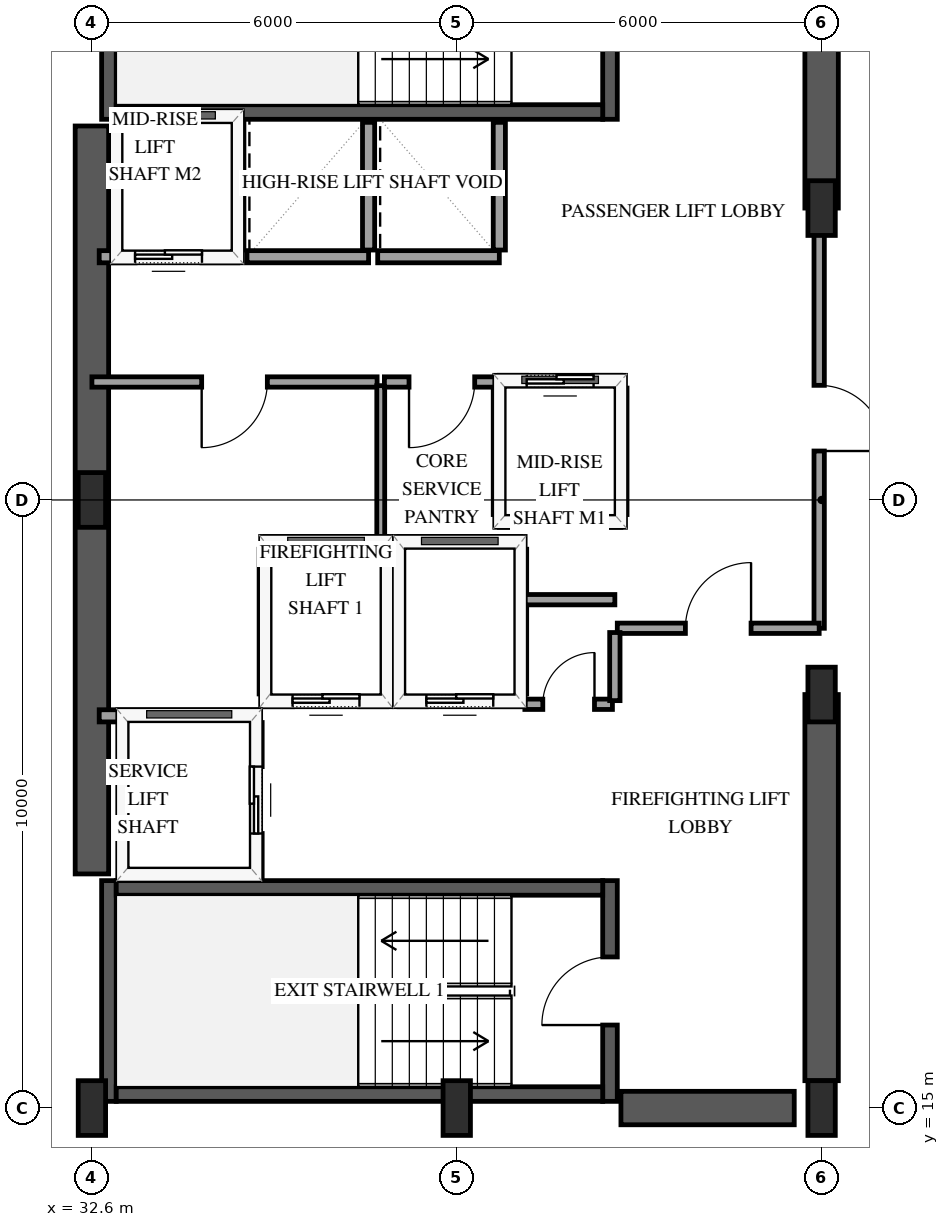
"""IFC4 building model, lengths in metres.
Left out: names, types, materials, properties, quantities, classifications, styles, units other than length and angle.
Written with IfcOpenShell. Run it as: python <this file> out.ifc"""

import sys

from ifc_helpers import new_model, si_unit, direction, frame, frame_2d, origin, origin_2d, place, context, subcontext, project, spatial, rectangle, extrude, element, fill, save


model = new_model("IFC4")
c1 = context("Model", 3, precision=1e-05, world=origin(), true_north=direction((0.0, 1.0)))
c2 = subcontext(c1, "Body", "Model", "MODEL_VIEW")
j1 = project(units=[si_unit("LENGTHUNIT", "METRE"), si_unit("PLANEANGLEUNIT", "RADIAN")], contexts=[c1])
p1 = place(None, origin())
s1 = spatial("IfcSite", under=j1, at=p1, CompositionType="ELEMENT")
p2 = place(p1, origin())
s2 = spatial("IfcBuilding", under=s1, at=p2, CompositionType="ELEMENT")
p3 = place(p2, frame((0.0, 0.0, 167.8)))
s3 = spatial("IfcBuildingStorey", under=s2, at=p3, CompositionType="ELEMENT", Elevation=167.8)
p4 = place(p3, frame((32.88, 15.11, 0.0), z_axis=(0.0, 0.0, 1.0), x_axis=(0.0, 1.0, 0.0)))
e1 = element("IfcWall", 1, at=p4, inside=s3, PredefinedType="SHEAR", context=c2, shape_type="SweptSolid", body=[
    extrude(rectangle(XDim=3.63, YDim=0.24, at=frame_2d((1.815, 0.0))), origin(), (0.0, 0.0, 1.0), 3.6),
])
p5 = place(p3, frame((41.12, 15.11, 0.0), z_axis=(0.0, 0.0, 1.0), x_axis=(0.0, 1.0, 0.0)))
e2 = element("IfcWall", 2, at=p5, inside=s3, PredefinedType="SHEAR", context=c2, shape_type="SweptSolid", body=[
    extrude(rectangle(XDim=3.63, YDim=0.24, at=frame_2d((1.815, 0.0))), origin(), (0.0, 0.0, 1.0), 3.6),
])
p6 = place(p5, frame((1.255, 0.0, 0.0)))
e3 = element("IfcOpeningElement", 3, at=p6, cuts=e2, PredefinedType="OPENING", context=c2, shape_type="SweptSolid", body=[
    extrude(rectangle(XDim=1.12, YDim=2.15, at=frame_2d((0.56, 1.075))), frame((0.0, 0.13, 0.0), z_axis=(0.0, -1.0, 0.0), x_axis=(1.0, 0.0, 0.0)), (0.0, 0.0, 1.0), 0.26),
])
for number, where, z_axis, x_axis in (
    (4, (33.0, 15.23, 0.0), (0.0, 0.0, 1.0), (1.0, 0.0, 0.0)),
    (5, (33.0, 18.62, 0.0), (0.0, 0.0, 1.0), (1.0, 0.0, 0.0)),
):
    element("IfcWall", number, at=place(p3, frame(where, z_axis=z_axis, x_axis=x_axis)), inside=s3, PredefinedType="SHEAR", context=c2, shape_type="SweptSolid", body=[
        extrude(rectangle(XDim=8.0, YDim=0.24, at=frame_2d((4.0, 0.0))), origin(), (0.0, 0.0, 1.0), 3.6),
    ])
p7 = place(p3, frame((32.88, 31.26, 0.0), z_axis=(0.0, 0.0, 1.0), x_axis=(0.0, 1.0, 0.0)))
e6 = element("IfcWall", 6, at=p7, inside=s3, PredefinedType="SHEAR", context=c2, shape_type="SweptSolid", body=[
    extrude(rectangle(XDim=3.63, YDim=0.24, at=frame_2d((1.815, 0.0))), origin(), (0.0, 0.0, 1.0), 3.6),
])
p8 = place(p3, frame((41.12, 31.26, 0.0), z_axis=(0.0, 0.0, 1.0), x_axis=(0.0, 1.0, 0.0)))
e7 = element("IfcWall", 7, at=p8, inside=s3, PredefinedType="SHEAR", context=c2, shape_type="SweptSolid", body=[
    extrude(rectangle(XDim=3.63, YDim=0.24, at=frame_2d((1.815, 0.0))), origin(), (0.0, 0.0, 1.0), 3.6),
])
p9 = place(p8, frame((1.255, 0.0, 0.0)))
e8 = element("IfcOpeningElement", 8, at=p9, cuts=e7, PredefinedType="OPENING", context=c2, shape_type="SweptSolid", body=[
    extrude(rectangle(XDim=1.12, YDim=2.15, at=frame_2d((0.56, 1.075))), frame((0.0, 0.13, 0.0), z_axis=(0.0, -1.0, 0.0), x_axis=(1.0, 0.0, 0.0)), (0.0, 0.0, 1.0), 0.26),
])
p10 = place(p3, frame((33.0, 31.38, 0.0), z_axis=(0.0, 0.0, 1.0), x_axis=(1.0, 0.0, 0.0)))
e9 = element("IfcWall", 9, at=p10, inside=s3, PredefinedType="SHEAR", context=c2, shape_type="SweptSolid", body=[
    extrude(rectangle(XDim=8.0, YDim=0.24, at=frame_2d((4.0, 0.0))), origin(), (0.0, 0.0, 1.0), 3.6),
])
p11 = place(p3, frame((32.6, 18.85, 0.0), z_axis=(0.0, 0.0, 1.0), x_axis=(0.0, 1.0, 0.0)))
e10 = element("IfcWall", 10, at=p11, inside=s3, PredefinedType="SHEAR", context=c2, shape_type="SweptSolid", body=[
    extrude(rectangle(XDim=12.3, YDim=0.55, at=frame_2d((6.15, 0.0))), origin(), (0.0, 0.0, 1.0), 3.6),
])
p12 = place(p3, frame((41.3, 15.0, 0.0), z_axis=(0.0, 0.0, 1.0), x_axis=(1.0, 0.0, 0.0)))
e11 = element("IfcWall", 11, at=p12, inside=s3, PredefinedType="SHEAR", context=c2, shape_type="SweptSolid", body=[
    extrude(rectangle(XDim=2.85, YDim=0.55, at=frame_2d((1.425, 0.0))), origin(), (0.0, 0.0, 1.0), 3.6),
])
p13 = place(p3, frame((44.6, 15.45, 0.0), z_axis=(0.0, 0.0, 1.0), x_axis=(0.0, 1.0, 0.0)))
e12 = element("IfcWall", 12, at=p13, inside=s3, PredefinedType="SHEAR", context=c2, shape_type="SweptSolid", body=[
    extrude(rectangle(XDim=6.35, YDim=0.55, at=frame_2d((3.175, 0.0))), origin(), (0.0, 0.0, 1.0), 3.6),
])
p14 = place(p3, frame((44.6, 29.8, 0.0), z_axis=(0.0, 0.0, 1.0), x_axis=(0.0, 1.0, 0.0)))
e13 = element("IfcWall", 13, at=p14, inside=s3, PredefinedType="SHEAR", context=c2, shape_type="SweptSolid", body=[
    extrude(rectangle(XDim=4.75, YDim=0.55, at=frame_2d((2.375, 0.0))), origin(), (0.0, 0.0, 1.0), 3.6),
])
for number, where, z_axis, x_axis in (
    (14, (32.6, 15.0, 0.0), (0.0, 0.0, 1.0), (1.0, 0.0, 0.0)),
    (15, (32.6, 25.0, 0.0), (0.0, 0.0, 1.0), (1.0, 0.0, 0.0)),
    (16, (38.6, 15.0, 0.0), (0.0, 0.0, 1.0), (1.0, 0.0, 0.0)),
    (17, (44.6, 15.0, 0.0), (0.0, 0.0, 1.0), (1.0, 0.0, 0.0)),
    (18, (44.6, 21.8, 0.0), (0.0, 0.0, 1.0), (1.0, 0.0, 0.0)),
    (19, (44.6, 29.8, 0.0), (0.0, 0.0, 1.0), (1.0, 0.0, 0.0)),
):
    element("IfcColumn", number, at=place(p3, frame(where, z_axis=z_axis, x_axis=x_axis)), inside=s3, PredefinedType="PILASTER", context=c2, shape_type="SweptSolid", body=[
        extrude(rectangle(XDim=0.45, YDim=0.9, at=origin_2d()), origin(), (0.0, 0.0, 1.0), 3.6),
    ])
p15 = place(p3, frame((35.45, 21.7, 0.0), z_axis=(0.0, 0.0, 1.0), x_axis=(1.0, 0.0, 0.0)))
e20 = element("IfcWall", 20, at=p15, inside=s3, PredefinedType="SOLIDWALL", context=c2, shape_type="SweptSolid", body=[
    extrude(rectangle(XDim=2.0, YDim=0.2, at=frame_2d((1.0, 0.0))), origin(), (0.0, 0.0, 1.0), 3.3),
])
p16 = place(p15, frame((0.45, 0.0, 0.0)))
e21 = element("IfcOpeningElement", 21, at=p16, cuts=e20, PredefinedType="OPENING", context=c2, shape_type="SweptSolid", body=[
    extrude(rectangle(XDim=1.1, YDim=2.15, at=frame_2d((0.55, 1.075))), frame((0.0, 0.11, 0.0), z_axis=(0.0, -1.0, 0.0), x_axis=(1.0, 0.0, 0.0)), (0.0, 0.0, 1.0), 0.22),
])
p17 = place(p3, frame((35.45, 24.3, 0.0), z_axis=(0.0, 0.0, 1.0), x_axis=(1.0, 0.0, 0.0)))
e22 = element("IfcWall", 22, at=p17, inside=s3, PredefinedType="SOLIDWALL", context=c2, shape_type="SweptSolid", body=[
    extrude(rectangle(XDim=2.0, YDim=0.2, at=frame_2d((1.0, 0.0))), origin(), (0.0, 0.0, 1.0), 3.3),
])
for number, where, z_axis, x_axis in (
    (23, (35.45, 21.81, 0.0), (0.0, 0.0, 1.0), (0.0, 1.0, 0.0)),
    (24, (37.45, 21.81, 0.0), (0.0, 0.0, 1.0), (0.0, 1.0, 0.0)),
):
    element("IfcWall", number, at=place(p3, frame(where, z_axis=z_axis, x_axis=x_axis)), inside=s3, PredefinedType="SOLIDWALL", context=c2, shape_type="SweptSolid", body=[
        extrude(rectangle(XDim=2.38, YDim=0.2, at=frame_2d((1.19, 0.0))), origin(), (0.0, 0.0, 1.0), 3.3),
    ])
p18 = place(p3, frame((37.65, 21.7, 0.0), z_axis=(0.0, 0.0, 1.0), x_axis=(1.0, 0.0, 0.0)))
e25 = element("IfcWall", 25, at=p18, inside=s3, PredefinedType="SOLIDWALL", context=c2, shape_type="SweptSolid", body=[
    extrude(rectangle(XDim=2.0, YDim=0.2, at=frame_2d((1.0, 0.0))), origin(), (0.0, 0.0, 1.0), 3.3),
])
p19 = place(p18, frame((0.45, 0.0, 0.0)))
e26 = element("IfcOpeningElement", 26, at=p19, cuts=e25, PredefinedType="OPENING", context=c2, shape_type="SweptSolid", body=[
    extrude(rectangle(XDim=1.1, YDim=2.15, at=frame_2d((0.55, 1.075))), frame((0.0, 0.11, 0.0), z_axis=(0.0, -1.0, 0.0), x_axis=(1.0, 0.0, 0.0)), (0.0, 0.0, 1.0), 0.22),
])
p20 = place(p3, frame((37.65, 24.3, 0.0), z_axis=(0.0, 0.0, 1.0), x_axis=(1.0, 0.0, 0.0)))
e27 = element("IfcWall", 27, at=p20, inside=s3, PredefinedType="SOLIDWALL", context=c2, shape_type="SweptSolid", body=[
    extrude(rectangle(XDim=2.0, YDim=0.2, at=frame_2d((1.0, 0.0))), origin(), (0.0, 0.0, 1.0), 3.3),
])
p21 = place(p3, frame((39.65, 21.81, 0.0), z_axis=(0.0, 0.0, 1.0), x_axis=(0.0, 1.0, 0.0)))
e28 = element("IfcWall", 28, at=p21, inside=s3, PredefinedType="SOLIDWALL", context=c2, shape_type="SweptSolid", body=[
    extrude(rectangle(XDim=2.38, YDim=0.2, at=frame_2d((1.19, 0.0))), origin(), (0.0, 0.0, 1.0), 3.3),
])
p22 = place(p3, frame((32.72, 21.45, 0.0), z_axis=(0.0, 0.0, 1.0), x_axis=(1.0, 0.0, 0.0)))
e29 = element("IfcWall", 29, at=p22, inside=s3, PredefinedType="SOLIDWALL", context=c2, shape_type="SweptSolid", body=[
    extrude(rectangle(XDim=2.58, YDim=0.2, at=frame_2d((1.29, 0.0))), origin(), (0.0, 0.0, 1.0), 3.3),
])
p23 = place(p3, frame((35.3, 18.79, 0.0), z_axis=(0.0, 0.0, 1.0), x_axis=(0.0, 1.0, 0.0)))
e30 = element("IfcWall", 30, at=p23, inside=s3, PredefinedType="SOLIDWALL", context=c2, shape_type="SweptSolid", body=[
    extrude(rectangle(XDim=2.55, YDim=0.2, at=frame_2d((1.275, 0.0))), origin(), (0.0, 0.0, 1.0), 3.3),
])
p24 = place(p23, frame((0.725, 0.0, 0.0)))
e31 = element("IfcOpeningElement", 31, at=p24, cuts=e30, PredefinedType="OPENING", context=c2, shape_type="SweptSolid", body=[
    extrude(rectangle(XDim=1.1, YDim=2.15, at=frame_2d((0.55, 1.075))), frame((0.0, 0.11, 0.0), z_axis=(0.0, -1.0, 0.0), x_axis=(1.0, 0.0, 0.0)), (0.0, 0.0, 1.0), 0.22),
])
p25 = place(p3, frame((39.3, 24.65, 0.0), z_axis=(0.0, 0.0, 1.0), x_axis=(1.0, 0.0, 0.0)))
e32 = element("IfcWall", 32, at=p25, inside=s3, PredefinedType="SOLIDWALL", context=c2, shape_type="SweptSolid", body=[
    extrude(rectangle(XDim=2.0, YDim=0.2, at=frame_2d((1.0, 0.0))), origin(), (0.0, 0.0, 1.0), 3.3),
])
p26 = place(p3, frame((39.3, 26.95, 0.0), z_axis=(0.0, 0.0, 1.0), x_axis=(1.0, 0.0, 0.0)))
e33 = element("IfcWall", 33, at=p26, inside=s3, PredefinedType="SOLIDWALL", context=c2, shape_type="SweptSolid", body=[
    extrude(rectangle(XDim=2.0, YDim=0.2, at=frame_2d((1.0, 0.0))), origin(), (0.0, 0.0, 1.0), 3.3),
])
p27 = place(p26, frame((0.45, 0.0, 0.0)))
e34 = element("IfcOpeningElement", 34, at=p27, cuts=e33, PredefinedType="OPENING", context=c2, shape_type="SweptSolid", body=[
    extrude(rectangle(XDim=1.1, YDim=2.15, at=frame_2d((0.55, 1.075))), frame((0.0, 0.11, 0.0), z_axis=(0.0, -1.0, 0.0), x_axis=(1.0, 0.0, 0.0)), (0.0, 0.0, 1.0), 0.22),
])
for number, where, z_axis, x_axis in (
    (35, (39.3, 24.76, 0.0), (0.0, 0.0, 1.0), (0.0, 1.0, 0.0)),
    (36, (41.3, 24.76, 0.0), (0.0, 0.0, 1.0), (0.0, 1.0, 0.0)),
):
    element("IfcWall", number, at=place(p3, frame(where, z_axis=z_axis, x_axis=x_axis)), inside=s3, PredefinedType="SOLIDWALL", context=c2, shape_type="SweptSolid", body=[
        extrude(rectangle(XDim=2.08, YDim=0.2, at=frame_2d((1.04, 0.0))), origin(), (0.0, 0.0, 1.0), 3.3),
    ])
p28 = place(p3, frame((32.72, 29.0, 0.0), z_axis=(0.0, 0.0, 1.0), x_axis=(1.0, 0.0, 0.0)))
e37 = element("IfcWall", 37, at=p28, inside=s3, PredefinedType="SOLIDWALL", context=c2, shape_type="SweptSolid", body=[
    extrude(rectangle(XDim=2.28, YDim=0.2, at=frame_2d((1.14, 0.0))), origin(), (0.0, 0.0, 1.0), 3.3),
])
p29 = place(p28, frame((0.59, 0.0, 0.0)))
e38 = element("IfcOpeningElement", 38, at=p29, cuts=e37, PredefinedType="OPENING", context=c2, shape_type="SweptSolid", body=[
    extrude(rectangle(XDim=1.1, YDim=2.15, at=frame_2d((0.55, 1.075))), frame((0.0, 0.11, 0.0), z_axis=(0.0, -1.0, 0.0), x_axis=(1.0, 0.0, 0.0)), (0.0, 0.0, 1.0), 0.22),
])
p30 = place(p3, frame((35.0, 29.11, 0.0), z_axis=(0.0, 0.0, 1.0), x_axis=(0.0, 1.0, 0.0)))
e39 = element("IfcWall", 39, at=p30, inside=s3, PredefinedType="SOLIDWALL", context=c2, shape_type="SweptSolid", body=[
    extrude(rectangle(XDim=2.1, YDim=0.2, at=frame_2d((1.05, 0.0))), origin(), (0.0, 0.0, 1.0), 3.3),
])
p31 = place(p3, frame((35.15, 29.0, 0.0), z_axis=(0.0, 0.0, 1.0), x_axis=(1.0, 0.0, 0.0)))
e40 = element("IfcWall", 40, at=p31, inside=s3, PredefinedType="SOLIDWALL", context=c2, shape_type="SweptSolid", body=[
    extrude(rectangle(XDim=2.0, YDim=0.2, at=frame_2d((1.0, 0.0))), origin(), (0.0, 0.0, 1.0), 2.674),
])
p32 = place(p3, frame((37.15, 29.11, 0.0), z_axis=(0.0, 0.0, 1.0), x_axis=(0.0, 1.0, 0.0)))
e41 = element("IfcWall", 41, at=p32, inside=s3, PredefinedType="SOLIDWALL", context=c2, shape_type="SweptSolid", body=[
    extrude(rectangle(XDim=2.1, YDim=0.2, at=frame_2d((1.05, 0.0))), origin(), (0.0, 0.0, 1.0), 3.3),
])
p33 = place(p3, frame((37.3, 29.0, 0.0), z_axis=(0.0, 0.0, 1.0), x_axis=(1.0, 0.0, 0.0)))
e42 = element("IfcWall", 42, at=p33, inside=s3, PredefinedType="SOLIDWALL", context=c2, shape_type="SweptSolid", body=[
    extrude(rectangle(XDim=2.0, YDim=0.2, at=frame_2d((1.0, 0.0))), origin(), (0.0, 0.0, 1.0), 2.674),
])
p34 = place(p3, frame((39.3, 29.11, 0.0), z_axis=(0.0, 0.0, 1.0), x_axis=(0.0, 1.0, 0.0)))
e43 = element("IfcWall", 43, at=p34, inside=s3, PredefinedType="SOLIDWALL", context=c2, shape_type="SweptSolid", body=[
    extrude(rectangle(XDim=2.1, YDim=0.2, at=frame_2d((1.05, 0.0))), origin(), (0.0, 0.0, 1.0), 3.3),
])
p35 = place(p3, frame((44.56, 29.8, 0.0), z_axis=(0.0, 0.0, 1.0), x_axis=(0.0, -1.0, 0.0)))
e44 = element("IfcWall", 44, at=p35, inside=s3, PredefinedType="PARTITIONING", context=c2, shape_type="SweptSolid", body=[
    extrude(rectangle(XDim=6.91, YDim=0.17, at=frame_2d((3.455, 0.0))), origin(), (0.0, 0.0, 1.0), 2.34),
])
p36 = place(p35, frame((2.915, 0.0, 0.0)))
e45 = element("IfcOpeningElement", 45, at=p36, cuts=e44, PredefinedType="OPENING", context=c2, shape_type="SweptSolid", body=[
    extrude(rectangle(XDim=1.08, YDim=2.15, at=frame_2d((0.54, 1.075))), frame((0.0, 0.095, 0.0), z_axis=(0.0, -1.0, 0.0), x_axis=(1.0, 0.0, 0.0)), (0.0, 0.0, 1.0), 0.19),
])
p37 = place(p3, frame((37.29, 26.94, 0.0), z_axis=(0.0, 0.0, 1.0), x_axis=(-1.0, 0.0, 0.0)))
e46 = element("IfcWall", 46, at=p37, inside=s3, PredefinedType="PARTITIONING", context=c2, shape_type="SweptSolid", body=[
    extrude(rectangle(XDim=4.69, YDim=0.17, at=frame_2d((2.345, 0.0))), origin(), (0.0, 0.0, 1.0), 3.3),
])
p38 = place(p37, frame((1.805, 0.0, 0.0)))
e47 = element("IfcOpeningElement", 47, at=p38, cuts=e46, PredefinedType="OPENING", context=c2, shape_type="SweptSolid", body=[
    extrude(rectangle(XDim=1.08, YDim=2.15, at=frame_2d((0.54, 1.075))), frame((0.0, 0.095, 0.0), z_axis=(0.0, -1.0, 0.0), x_axis=(1.0, 0.0, 0.0)), (0.0, 0.0, 1.0), 0.19),
])
p39 = place(p3, frame((41.24, 22.89, 0.0), z_axis=(0.0, 0.0, 1.0), x_axis=(1.0, 0.0, 0.0)))
e48 = element("IfcWall", 48, at=p39, inside=s3, PredefinedType="PARTITIONING", context=c2, shape_type="SweptSolid", body=[
    extrude(rectangle(XDim=3.32, YDim=0.17, at=frame_2d((1.66, 0.0))), origin(), (0.0, 0.0, 1.0), 3.3),
])
p40 = place(p39, frame((1.12, 0.0, 0.0)))
e49 = element("IfcOpeningElement", 49, at=p40, cuts=e48, PredefinedType="OPENING", context=c2, shape_type="SweptSolid", body=[
    extrude(rectangle(XDim=1.08, YDim=2.15, at=frame_2d((0.54, 1.075))), frame((0.0, 0.095, 0.0), z_axis=(0.0, -1.0, 0.0), x_axis=(1.0, 0.0, 0.0)), (0.0, 0.0, 1.0), 0.19),
])
p41 = place(p3, frame((37.35, 26.88, 0.0), z_axis=(0.0, 0.0, 1.0), x_axis=(0.0, -1.0, 0.0)))
e50 = element("IfcWall", 50, at=p41, inside=s3, PredefinedType="PARTITIONING", context=c2, shape_type="SweptSolid", body=[
    extrude(rectangle(XDim=2.58, YDim=0.13, at=frame_2d((1.29, 0.0))), origin(), (0.0, 0.0, 1.0), 3.3),
])
p42 = place(p3, frame((39.3, 26.94, 0.0), z_axis=(0.0, 0.0, 1.0), x_axis=(-1.0, 0.0, 0.0)))
e51 = element("IfcWall", 51, at=p42, inside=s3, PredefinedType="PARTITIONING", context=c2, shape_type="SweptSolid", body=[
    extrude(rectangle(XDim=1.89, YDim=0.17, at=frame_2d((0.945, 0.0))), origin(), (0.0, 0.0, 1.0), 3.3),
])
p43 = place(p42, frame((0.405, 0.0, 0.0)))
e52 = element("IfcOpeningElement", 52, at=p43, cuts=e51, PredefinedType="OPENING", context=c2, shape_type="SweptSolid", body=[
    extrude(rectangle(XDim=1.08, YDim=2.15, at=frame_2d((0.54, 1.075))), frame((0.0, 0.095, 0.0), z_axis=(0.0, -1.0, 0.0), x_axis=(1.0, 0.0, 0.0)), (0.0, 0.0, 1.0), 0.19),
])
p44 = place(p3, frame((39.72, 21.64, 0.0), z_axis=(0.0, 0.0, 1.0), x_axis=(1.0, 0.0, 0.0)))
e53 = element("IfcWall", 53, at=p44, inside=s3, PredefinedType="PARTITIONING", context=c2, shape_type="SweptSolid", body=[
    extrude(rectangle(XDim=1.44, YDim=0.17, at=frame_2d((0.72, 0.0))), origin(), (0.0, 0.0, 1.0), 3.3),
])
p45 = place(p44, frame((0.295, 0.0, 0.0)))
e54 = element("IfcOpeningElement", 54, at=p45, cuts=e53, PredefinedType="OPENING", context=c2, shape_type="SweptSolid", body=[
    extrude(rectangle(XDim=0.85, YDim=2.1, at=frame_2d((0.425, 1.05))), frame((0.0, 0.095, 0.0), z_axis=(0.0, -1.0, 0.0), x_axis=(1.0, 0.0, 0.0)), (0.0, 0.0, 1.0), 0.19),
])
p46 = place(p3, frame((41.2, 21.7, 0.0), z_axis=(0.0, 0.0, 1.0), x_axis=(0.0, 1.0, 0.0)))
e55 = element("IfcWall", 55, at=p46, inside=s3, PredefinedType="PARTITIONING", context=c2, shape_type="SweptSolid", body=[
    extrude(rectangle(XDim=1.12, YDim=0.17, at=frame_2d((0.56, 0.0))), origin(), (0.0, 0.0, 1.0), 3.3),
])
p47 = place(p3, frame((41.2, 23.36, 0.0), z_axis=(0.0, 0.0, 1.0), x_axis=(-1.0, 0.0, 0.0)))
e56 = element("IfcWall", 56, at=p47, inside=s3, PredefinedType="PARTITIONING", context=c2, shape_type="SweptSolid", body=[
    extrude(rectangle(XDim=1.48, YDim=0.17, at=frame_2d((0.74, 0.0))), origin(), (0.0, 0.0, 1.0), 3.3),
])
p48 = place(p16, origin())
e57 = element("IfcDoor", 57, at=p48, inside=s3, OperationType="SLIDING_TO_LEFT", PredefinedType="DOOR", context=c2, shape_type="SweptSolid", body=[
    extrude(rectangle(XDim=1.1, YDim=2.15, at=frame_2d((0.55, 1.075))), frame((0.0, 0.025, 0.0), z_axis=(0.0, -1.0, 0.0), x_axis=(1.0, 0.0, 0.0)), (0.0, 0.0, 1.0), 0.05),
])
fill(e21, e57)
p49 = place(p19, origin())
e58 = element("IfcDoor", 58, at=p49, inside=s3, OperationType="SLIDING_TO_LEFT", PredefinedType="DOOR", context=c2, shape_type="SweptSolid", body=[
    extrude(rectangle(XDim=1.1, YDim=2.15, at=frame_2d((0.55, 1.075))), frame((0.0, 0.025, 0.0), z_axis=(0.0, -1.0, 0.0), x_axis=(1.0, 0.0, 0.0)), (0.0, 0.0, 1.0), 0.05),
])
fill(e26, e58)
p50 = place(p24, origin())
e59 = element("IfcDoor", 59, at=p50, inside=s3, OperationType="SLIDING_TO_LEFT", PredefinedType="DOOR", context=c2, shape_type="SweptSolid", body=[
    extrude(rectangle(XDim=1.1, YDim=2.15, at=frame_2d((0.55, 1.075))), frame((0.0, 0.025, 0.0), z_axis=(0.0, -1.0, 0.0), x_axis=(1.0, 0.0, 0.0)), (0.0, 0.0, 1.0), 0.05),
])
fill(e31, e59)
p51 = place(p27, origin())
e60 = element("IfcDoor", 60, at=p51, inside=s3, OperationType="SLIDING_TO_LEFT", PredefinedType="DOOR", context=c2, shape_type="SweptSolid", body=[
    extrude(rectangle(XDim=1.1, YDim=2.15, at=frame_2d((0.55, 1.075))), frame((0.0, 0.025, 0.0), z_axis=(0.0, -1.0, 0.0), x_axis=(1.0, 0.0, 0.0)), (0.0, 0.0, 1.0), 0.05),
])
fill(e34, e60)
p52 = place(p29, origin())
e61 = element("IfcDoor", 61, at=p52, inside=s3, OperationType="SLIDING_TO_LEFT", PredefinedType="DOOR", context=c2, shape_type="SweptSolid", body=[
    extrude(rectangle(XDim=1.1, YDim=2.15, at=frame_2d((0.55, 1.075))), frame((0.0, 0.025, 0.0), z_axis=(0.0, -1.0, 0.0), x_axis=(1.0, 0.0, 0.0)), (0.0, 0.0, 1.0), 0.05),
])
fill(e38, e61)
p53 = place(p6, origin())
e62 = element("IfcDoor", 62, at=p53, inside=s3, OperationType="SINGLE_SWING_LEFT", PredefinedType="DOOR", context=c2, shape_type="SweptSolid", body=[
    extrude(rectangle(XDim=1.12, YDim=2.15, at=frame_2d((0.56, 1.075))), frame((0.0, 0.025, 0.0), z_axis=(0.0, -1.0, 0.0), x_axis=(1.0, 0.0, 0.0)), (0.0, 0.0, 1.0), 0.05),
])
fill(e3, e62)
p54 = place(p36, origin())
e63 = element("IfcDoor", 63, at=p54, inside=s3, OperationType="SINGLE_SWING_RIGHT", PredefinedType="DOOR", context=c2, shape_type="SweptSolid", body=[
    extrude(rectangle(XDim=1.08, YDim=2.15, at=frame_2d((0.54, 1.075))), frame((0.0, 0.025, 0.0), z_axis=(0.0, -1.0, 0.0), x_axis=(1.0, 0.0, 0.0)), (0.0, 0.0, 1.0), 0.05),
])
fill(e45, e63)
p55 = place(p38, origin())
e64 = element("IfcDoor", 64, at=p55, inside=s3, OperationType="SINGLE_SWING_RIGHT", PredefinedType="DOOR", context=c2, shape_type="SweptSolid", body=[
    extrude(rectangle(XDim=1.08, YDim=2.15, at=frame_2d((0.54, 1.075))), frame((0.0, 0.025, 0.0), z_axis=(0.0, -1.0, 0.0), x_axis=(1.0, 0.0, 0.0)), (0.0, 0.0, 1.0), 0.05),
])
fill(e47, e64)
p56 = place(p40, origin())
e65 = element("IfcDoor", 65, at=p56, inside=s3, OperationType="SINGLE_SWING_RIGHT", PredefinedType="DOOR", context=c2, shape_type="SweptSolid", body=[
    extrude(rectangle(XDim=1.08, YDim=2.15, at=frame_2d((0.54, 1.075))), frame((0.0, 0.025, 0.0), z_axis=(0.0, -1.0, 0.0), x_axis=(1.0, 0.0, 0.0)), (0.0, 0.0, 1.0), 0.05),
])
fill(e49, e65)
p57 = place(p43, origin())
e66 = element("IfcDoor", 66, at=p57, inside=s3, OperationType="SINGLE_SWING_RIGHT", PredefinedType="DOOR", context=c2, shape_type="SweptSolid", body=[
    extrude(rectangle(XDim=1.08, YDim=2.15, at=frame_2d((0.54, 1.075))), frame((0.0, 0.025, 0.0), z_axis=(0.0, -1.0, 0.0), x_axis=(1.0, 0.0, 0.0)), (0.0, 0.0, 1.0), 0.05),
])
fill(e52, e66)
p58 = place(p45, origin())
e67 = element("IfcDoor", 67, at=p58, inside=s3, OperationType="SINGLE_SWING_RIGHT", PredefinedType="DOOR", context=c2, shape_type="SweptSolid", body=[
    extrude(rectangle(XDim=0.85, YDim=2.1, at=frame_2d((0.425, 1.05))), frame((0.0, 0.025, 0.0), z_axis=(0.0, -1.0, 0.0), x_axis=(1.0, 0.0, 0.0)), (0.0, 0.0, 1.0), 0.05),
])
fill(e54, e67)
save(model, sys.argv[1])
